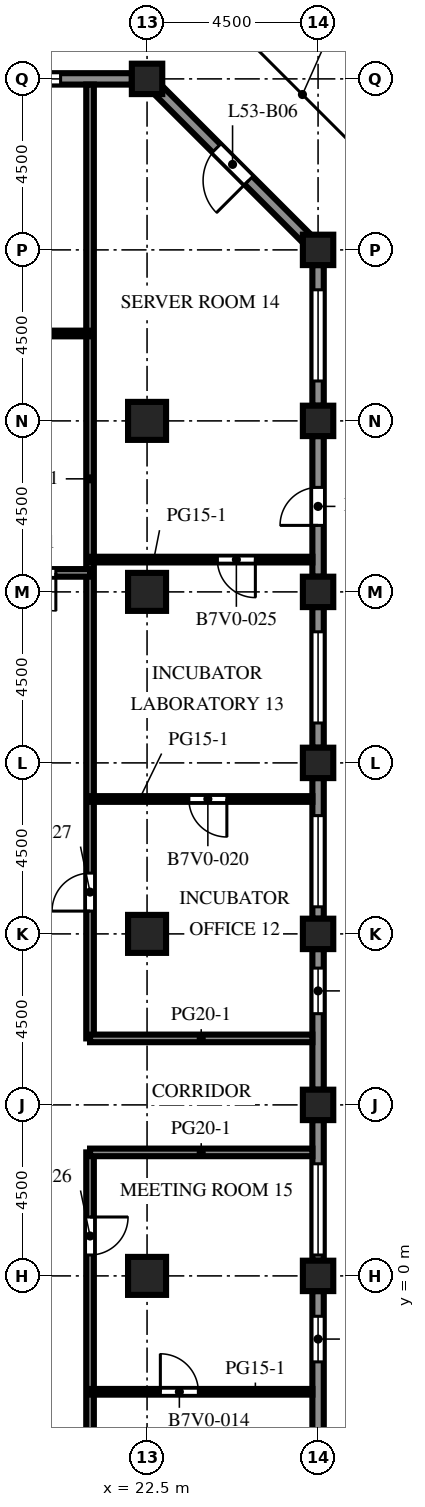
"""IFC4 building model, lengths in metres.
Left out: names, types, materials, properties, quantities, classifications, styles, units other than length and angle.
Written with IfcOpenShell. Run it as: python <this file> out.ifc"""

import sys

from ifc_helpers import new_model, si_unit, direction, frame, frame_2d, origin, origin_2d, place, context, subcontext, project, spatial, rectangle, extrude, element, fill, save


model = new_model("IFC4")
c1 = context("Model", 3, precision=1e-05, world=origin(), true_north=direction((0.0, 1.0)))
c2 = subcontext(c1, "Body", "Model", "MODEL_VIEW")
j1 = project(units=[si_unit("LENGTHUNIT", "METRE"), si_unit("PLANEANGLEUNIT", "RADIAN")], contexts=[c1])
p1 = place(None, origin())
s1 = spatial("IfcSite", under=j1, at=p1, CompositionType="ELEMENT")
p2 = place(p1, origin())
s2 = spatial("IfcBuilding", under=s1, at=p2, CompositionType="ELEMENT")
p3 = place(p2, frame((0.0, 0.0, 235.7)))
s3 = spatial("IfcBuildingStorey", under=s2, at=p3, CompositionType="ELEMENT", Elevation=235.7)
for number, where, z_axis, x_axis in (
    (1, (22.5, 31.5, 0.0), (0.0, 0.0, 1.0), (1.0, 0.0, 0.0)),
    (2, (27.0, 0.0, 0.0), (0.0, 0.0, 1.0), (1.0, 0.0, 0.0)),
    (3, (27.0, 4.5, 0.0), (0.0, 0.0, 1.0), (1.0, 0.0, 0.0)),
    (4, (27.0, 9.0, 0.0), (0.0, 0.0, 1.0), (1.0, 0.0, 0.0)),
    (5, (27.0, 13.5, 0.0), (0.0, 0.0, 1.0), (1.0, 0.0, 0.0)),
    (6, (27.0, 18.0, 0.0), (0.0, 0.0, 1.0), (1.0, 0.0, 0.0)),
    (7, (27.0, 22.5, 0.0), (0.0, 0.0, 1.0), (1.0, 0.0, 0.0)),
    (8, (27.0, 27.0, 0.0), (0.0, 0.0, 1.0), (1.0, 0.0, 0.0)),
):
    element("IfcColumn", number, at=place(p3, frame(where, z_axis=z_axis, x_axis=x_axis)), inside=s3, PredefinedType="COLUMN", context=c2, shape_type="SweptSolid", body=[
        extrude(rectangle(XDim=0.8, YDim=0.8, at=origin_2d()), origin(), (0.0, 0.0, 1.0), 4.1),
    ])
for number, where, z_axis, x_axis in (
    (9, (22.5, 0.0, 0.0), (0.0, 0.0, 1.0), (1.0, 0.0, 0.0)),
    (10, (22.5, 9.0, 0.0), (0.0, 0.0, 1.0), (1.0, 0.0, 0.0)),
    (11, (22.5, 18.0, 0.0), (0.0, 0.0, 1.0), (1.0, 0.0, 0.0)),
    (12, (22.5, 22.5, 0.0), (0.0, 0.0, 1.0), (1.0, 0.0, 0.0)),
):
    element("IfcColumn", number, at=place(p3, frame(where, z_axis=z_axis, x_axis=x_axis)), inside=s3, PredefinedType="COLUMN", context=c2, shape_type="SweptSolid", body=[
        extrude(rectangle(XDim=1.0, YDim=1.0, at=origin_2d()), origin(), (0.0, 0.0, 1.0), 4.1),
    ])
p4 = place(p3, frame((27.0, -0.4, 0.0), z_axis=(0.0, 0.0, 1.0), x_axis=(0.0, -1.0, 0.0)))
e13 = element("IfcWall", 13, at=p4, inside=s3, PredefinedType="SOLIDWALL", context=c2, shape_type="SweptSolid", body=[
    extrude(rectangle(XDim=3.7, YDim=0.3, at=frame_2d((1.85, 0.0))), origin(), (0.0, 0.0, 1.0), 2.85),
])
p5 = place(p4, frame((0.663, 0.0, 0.8)))
e14 = element("IfcOpeningElement", 14, at=p5, cuts=e13, PredefinedType="OPENING", context=c2, shape_type="SweptSolid", body=[
    extrude(rectangle(XDim=1.2, YDim=1.7, at=frame_2d((0.6, 0.85))), frame((0.0, 0.16, 0.0), z_axis=(0.0, -1.0, 0.0), x_axis=(1.0, 0.0, 0.0)), (0.0, 0.0, 1.0), 0.32),
])
p6 = place(p3, frame((27.0, 4.1, 0.0), z_axis=(0.0, 0.0, 1.0), x_axis=(0.0, -1.0, 0.0)))
e15 = element("IfcWall", 15, at=p6, inside=s3, PredefinedType="SOLIDWALL", context=c2, shape_type="SweptSolid", body=[
    extrude(rectangle(XDim=3.7, YDim=0.3, at=frame_2d((1.85, 0.0))), origin(), (0.0, 0.0, 1.0), 2.85),
])
p7 = place(p6, frame((1.15, 0.0, 0.8)))
e16 = element("IfcOpeningElement", 16, at=p7, cuts=e15, PredefinedType="OPENING", context=c2, shape_type="SweptSolid", body=[
    extrude(rectangle(XDim=2.4, YDim=1.7, at=frame_2d((1.2, 0.85))), frame((0.0, 0.16, 0.0), z_axis=(0.0, -1.0, 0.0), x_axis=(1.0, 0.0, 0.0)), (0.0, 0.0, 1.0), 0.32),
])
p8 = place(p3, frame((27.0, 8.6, 0.0), z_axis=(0.0, 0.0, 1.0), x_axis=(0.0, -1.0, 0.0)))
e17 = element("IfcWall", 17, at=p8, inside=s3, PredefinedType="SOLIDWALL", context=c2, shape_type="SweptSolid", body=[
    extrude(rectangle(XDim=3.7, YDim=0.3, at=frame_2d((1.85, 0.0))), origin(), (0.0, 0.0, 1.0), 2.85),
])
p9 = place(p8, frame((0.5, 0.0, 0.8)))
e18 = element("IfcOpeningElement", 18, at=p9, cuts=e17, PredefinedType="OPENING", context=c2, shape_type="SweptSolid", body=[
    extrude(rectangle(XDim=1.2, YDim=1.7, at=frame_2d((0.6, 0.85))), frame((0.0, 0.16, 0.0), z_axis=(0.0, -1.0, 0.0), x_axis=(1.0, 0.0, 0.0)), (0.0, 0.0, 1.0), 0.32),
])
p10 = place(p3, frame((27.0, 13.1, 0.0), z_axis=(0.0, 0.0, 1.0), x_axis=(0.0, -1.0, 0.0)))
e19 = element("IfcWall", 19, at=p10, inside=s3, PredefinedType="SOLIDWALL", context=c2, shape_type="SweptSolid", body=[
    extrude(rectangle(XDim=3.7, YDim=0.3, at=frame_2d((1.85, 0.0))), origin(), (0.0, 0.0, 1.0), 2.85),
])
p11 = place(p10, frame((0.988, 0.0, 0.8)))
e20 = element("IfcOpeningElement", 20, at=p11, cuts=e19, PredefinedType="OPENING", context=c2, shape_type="SweptSolid", body=[
    extrude(rectangle(XDim=2.4, YDim=1.7, at=frame_2d((1.2, 0.85))), frame((0.0, 0.16, 0.0), z_axis=(0.0, -1.0, 0.0), x_axis=(1.0, 0.0, 0.0)), (0.0, 0.0, 1.0), 0.32),
])
p12 = place(p3, frame((27.0, 17.6, 0.0), z_axis=(0.0, 0.0, 1.0), x_axis=(0.0, -1.0, 0.0)))
e21 = element("IfcWall", 21, at=p12, inside=s3, PredefinedType="SOLIDWALL", context=c2, shape_type="SweptSolid", body=[
    extrude(rectangle(XDim=3.7, YDim=0.3, at=frame_2d((1.85, 0.0))), origin(), (0.0, 0.0, 1.0), 2.85),
])
p13 = place(p12, frame((0.65, 0.0, 0.8)))
e22 = element("IfcOpeningElement", 22, at=p13, cuts=e21, PredefinedType="OPENING", context=c2, shape_type="SweptSolid", body=[
    extrude(rectangle(XDim=2.4, YDim=1.7, at=frame_2d((1.2, 0.85))), frame((0.0, 0.16, 0.0), z_axis=(0.0, -1.0, 0.0), x_axis=(1.0, 0.0, 0.0)), (0.0, 0.0, 1.0), 0.32),
])
p14 = place(p3, frame((27.0, 22.1, 0.0), z_axis=(0.0, 0.0, 1.0), x_axis=(0.0, -1.0, 0.0)))
e23 = element("IfcWall", 23, at=p14, inside=s3, PredefinedType="SOLIDWALL", context=c2, shape_type="SweptSolid", body=[
    extrude(rectangle(XDim=3.7, YDim=0.3, at=frame_2d((1.85, 0.0))), origin(), (0.0, 0.0, 1.0), 2.85),
])
p15 = place(p14, frame((1.35, 0.0, 0.0)))
e24 = element("IfcOpeningElement", 24, at=p15, cuts=e23, PredefinedType="OPENING", context=c2, shape_type="SweptSolid", body=[
    extrude(rectangle(XDim=1.0, YDim=2.2, at=frame_2d((0.5, 1.1))), frame((0.0, 0.16, 0.0), z_axis=(0.0, -1.0, 0.0), x_axis=(1.0, 0.0, 0.0)), (0.0, 0.0, 1.0), 0.32),
])
p16 = place(p3, frame((27.0, 26.6, 0.0), z_axis=(0.0, 0.0, 1.0), x_axis=(0.0, -1.0, 0.0)))
e25 = element("IfcWall", 25, at=p16, inside=s3, PredefinedType="SOLIDWALL", context=c2, shape_type="SweptSolid", body=[
    extrude(rectangle(XDim=3.7, YDim=0.3, at=frame_2d((1.85, 0.0))), origin(), (0.0, 0.0, 1.0), 2.85),
])
p17 = place(p16, frame((0.65, 0.0, 0.8)))
e26 = element("IfcOpeningElement", 26, at=p17, cuts=e25, PredefinedType="OPENING", context=c2, shape_type="SweptSolid", body=[
    extrude(rectangle(XDim=2.4, YDim=1.7, at=frame_2d((1.2, 0.85))), frame((0.0, 0.16, 0.0), z_axis=(0.0, -1.0, 0.0), x_axis=(1.0, 0.0, 0.0)), (0.0, 0.0, 1.0), 0.32),
])
p18 = place(p3, frame((22.794, 31.206, 0.0), z_axis=(0.0, 0.0, 1.0), x_axis=(0.707106781187, -0.707106781187, 0.0)))
e27 = element("IfcWall", 27, at=p18, inside=s3, PredefinedType="SOLIDWALL", context=c2, shape_type="SweptSolid", body=[
    extrude(rectangle(XDim=5.532, YDim=0.3, at=frame_2d((2.766, 0.0))), origin(), (0.0, 0.0, 1.0), 2.85),
])
p19 = place(p18, frame((2.166, 0.0, 0.0)))
e28 = element("IfcOpeningElement", 28, at=p19, cuts=e27, PredefinedType="OPENING", context=c2, shape_type="SweptSolid", body=[
    extrude(rectangle(XDim=1.2, YDim=2.2, at=frame_2d((0.6, 1.1))), frame((0.0, 0.16, 0.0), z_axis=(0.0, -1.0, 0.0), x_axis=(1.0, 0.0, 0.0)), (0.0, 0.0, 1.0), 0.32),
])
p20 = place(p3, frame((18.4, 31.5, 0.0), z_axis=(0.0, 0.0, 1.0), x_axis=(1.0, 0.0, 0.0)))
e29 = element("IfcWall", 29, at=p20, inside=s3, PredefinedType="SOLIDWALL", context=c2, shape_type="SweptSolid", body=[
    extrude(rectangle(XDim=3.7, YDim=0.3, at=frame_2d((1.85, 0.0))), origin(), (0.0, 0.0, 1.0), 2.85),
])
p21 = place(p20, frame((0.625, 0.0, 0.8)))
e30 = element("IfcOpeningElement", 30, at=p21, cuts=e29, PredefinedType="OPENING", context=c2, shape_type="SweptSolid", body=[
    extrude(rectangle(XDim=1.2, YDim=1.7, at=frame_2d((0.6, 0.85))), frame((0.0, 0.16, 0.0), z_axis=(0.0, -1.0, 0.0), x_axis=(1.0, 0.0, 0.0)), (0.0, 0.0, 1.0), 0.32),
])
p22 = place(p3, frame((21.0, 3.25, 0.0), z_axis=(0.0, 0.0, 1.0), x_axis=(0.0, -1.0, 0.0)))
e31 = element("IfcWall", 31, at=p22, inside=s3, PredefinedType="PARTITIONING", context=c2, shape_type="SweptSolid", body=[
    extrude(rectangle(XDim=25.6, YDim=0.2, at=frame_2d((12.8, 0.0))), origin(), (0.0, 0.0, 1.0), 3.65),
])
p23 = place(p22, frame((1.7, 0.0, 0.0)))
e32 = element("IfcOpeningElement", 32, at=p23, cuts=e31, PredefinedType="OPENING", context=c2, shape_type="SweptSolid", body=[
    extrude(rectangle(XDim=1.0, YDim=2.1, at=frame_2d((0.5, 1.05))), frame((0.0, 0.11, 0.0), z_axis=(0.0, -1.0, 0.0), x_axis=(1.0, 0.0, 0.0)), (0.0, 0.0, 1.0), 0.22),
])
p24 = place(p3, frame((21.0, 31.35, 0.0), z_axis=(0.0, 0.0, 1.0), x_axis=(0.0, -1.0, 0.0)))
e33 = element("IfcWall", 33, at=p24, inside=s3, PredefinedType="PARTITIONING", context=c2, shape_type="SweptSolid", body=[
    extrude(rectangle(XDim=25.1, YDim=0.2, at=frame_2d((12.55, 0.0))), origin(), (0.0, 0.0, 1.0), 3.65),
])
p25 = place(p24, frame((20.75, 0.0, 0.0)))
e34 = element("IfcOpeningElement", 34, at=p25, cuts=e33, PredefinedType="OPENING", context=c2, shape_type="SweptSolid", body=[
    extrude(rectangle(XDim=1.0, YDim=2.1, at=frame_2d((0.5, 1.05))), frame((0.0, 0.11, 0.0), z_axis=(0.0, -1.0, 0.0), x_axis=(1.0, 0.0, 0.0)), (0.0, 0.0, 1.0), 0.22),
])
p26 = place(p3, frame((26.85, -3.05, 0.0), z_axis=(0.0, 0.0, 1.0), x_axis=(-1.0, 0.0, 0.0)))
e35 = element("IfcWall", 35, at=p26, inside=s3, PredefinedType="PARTITIONING", context=c2, shape_type="SweptSolid", body=[
    extrude(rectangle(XDim=5.85, YDim=0.15, at=frame_2d((2.925, 0.0))), origin(), (0.0, 0.0, 1.0), 3.65),
])
p27 = place(p26, frame((3.0, 0.0, 0.0)))
e36 = element("IfcOpeningElement", 36, at=p27, cuts=e35, PredefinedType="OPENING", context=c2, shape_type="SweptSolid", body=[
    extrude(rectangle(XDim=1.0, YDim=2.1, at=frame_2d((0.5, 1.05))), frame((0.0, 0.085, 0.0), z_axis=(0.0, -1.0, 0.0), x_axis=(1.0, 0.0, 0.0)), (0.0, 0.0, 1.0), 0.17),
])
for number, where, z_axis, x_axis in (
    (37, (21.0, 3.25, 0.0), (0.0, 0.0, 1.0), (1.0, 0.0, 0.0)),
    (38, (21.0, 6.25, 0.0), (0.0, 0.0, 1.0), (1.0, 0.0, 0.0)),
):
    element("IfcWall", number, at=place(p3, frame(where, z_axis=z_axis, x_axis=x_axis)), inside=s3, PredefinedType="PARTITIONING", context=c2, shape_type="SweptSolid", body=[
        extrude(rectangle(XDim=5.85, YDim=0.2, at=frame_2d((2.925, 0.0))), origin(), (0.0, 0.0, 1.0), 3.65),
    ])
p28 = place(p3, frame((21.0, 12.55, 0.0), z_axis=(0.0, 0.0, 1.0), x_axis=(1.0, 0.0, 0.0)))
e39 = element("IfcWall", 39, at=p28, inside=s3, PredefinedType="PARTITIONING", context=c2, shape_type="SweptSolid", body=[
    extrude(rectangle(XDim=5.85, YDim=0.15, at=frame_2d((2.925, 0.0))), origin(), (0.0, 0.0, 1.0), 3.65),
])
p29 = place(p28, frame((2.6, 0.0, 0.0)))
e40 = element("IfcOpeningElement", 40, at=p29, cuts=e39, PredefinedType="OPENING", context=c2, shape_type="SweptSolid", body=[
    extrude(rectangle(XDim=1.0, YDim=2.1, at=frame_2d((0.5, 1.05))), frame((0.0, 0.085, 0.0), z_axis=(0.0, -1.0, 0.0), x_axis=(1.0, 0.0, 0.0)), (0.0, 0.0, 1.0), 0.17),
])
p30 = place(p3, frame((18.0, 18.5, 0.0), z_axis=(0.0, 0.0, 1.0), x_axis=(1.0, 0.0, 0.0)))
e41 = element("IfcWall", 41, at=p30, inside=s3, PredefinedType="PARTITIONING", context=c2, shape_type="SweptSolid", body=[
    extrude(rectangle(XDim=3.0, YDim=0.2, at=frame_2d((1.5, 0.0))), origin(), (0.0, 0.0, 1.0), 3.65),
])
p31 = place(p30, frame((1.1, 0.0, 0.0)))
e42 = element("IfcOpeningElement", 42, at=p31, cuts=e41, PredefinedType="OPENING", context=c2, shape_type="SweptSolid", body=[
    extrude(rectangle(XDim=1.0, YDim=2.1, at=frame_2d((0.5, 1.05))), frame((0.0, 0.11, 0.0), z_axis=(0.0, -1.0, 0.0), x_axis=(1.0, 0.0, 0.0)), (0.0, 0.0, 1.0), 0.22),
])
p32 = place(p3, frame((21.0, 18.85, 0.0), z_axis=(0.0, 0.0, 1.0), x_axis=(1.0, 0.0, 0.0)))
e43 = element("IfcWall", 43, at=p32, inside=s3, PredefinedType="PARTITIONING", context=c2, shape_type="SweptSolid", body=[
    extrude(rectangle(XDim=5.85, YDim=0.15, at=frame_2d((2.925, 0.0))), origin(), (0.0, 0.0, 1.0), 3.65),
])
p33 = place(p32, frame((3.35, 0.0, 0.0)))
e44 = element("IfcOpeningElement", 44, at=p33, cuts=e43, PredefinedType="OPENING", context=c2, shape_type="SweptSolid", body=[
    extrude(rectangle(XDim=1.0, YDim=2.1, at=frame_2d((0.5, 1.05))), frame((0.0, 0.085, 0.0), z_axis=(0.0, -1.0, 0.0), x_axis=(1.0, 0.0, 0.0)), (0.0, 0.0, 1.0), 0.17),
])
p34 = place(p3, frame((-13.5, 24.8, 0.0), z_axis=(0.0, 0.0, 1.0), x_axis=(1.0, 0.0, 0.0)))
e45 = element("IfcWall", 45, at=p34, inside=s3, PredefinedType="PARTITIONING", context=c2, shape_type="SweptSolid", body=[
    extrude(rectangle(XDim=34.5, YDim=0.15, at=frame_2d((17.25, 0.0))), origin(), (0.0, 0.0, 1.0), 3.65),
])
p35 = place(p34, frame((1.6, 0.0, 0.0)))
e46 = element("IfcOpeningElement", 46, at=p35, cuts=e45, PredefinedType="OPENING", context=c2, shape_type="SweptSolid", body=[
    extrude(rectangle(XDim=1.0, YDim=2.1, at=frame_2d((0.5, 1.05))), frame((0.0, 0.085, 0.0), z_axis=(0.0, -1.0, 0.0), x_axis=(1.0, 0.0, 0.0)), (0.0, 0.0, 1.0), 0.17),
])
p36 = place(p34, frame((10.35, 0.0, 0.0)))
e47 = element("IfcOpeningElement", 47, at=p36, cuts=e45, PredefinedType="OPENING", context=c2, shape_type="SweptSolid", body=[
    extrude(rectangle(XDim=1.0, YDim=2.1, at=frame_2d((0.5, 1.05))), frame((0.0, 0.085, 0.0), z_axis=(0.0, -1.0, 0.0), x_axis=(1.0, 0.0, 0.0)), (0.0, 0.0, 1.0), 0.17),
])
p37 = place(p34, frame((22.35, 0.0, 0.0)))
e48 = element("IfcOpeningElement", 48, at=p37, cuts=e45, PredefinedType="OPENING", context=c2, shape_type="SweptSolid", body=[
    extrude(rectangle(XDim=1.0, YDim=2.1, at=frame_2d((0.5, 1.05))), frame((0.0, 0.085, 0.0), z_axis=(0.0, -1.0, 0.0), x_axis=(1.0, 0.0, 0.0)), (0.0, 0.0, 1.0), 0.17),
])
p38 = place(p34, frame((31.1, 0.0, 0.0)))
e49 = element("IfcOpeningElement", 49, at=p38, cuts=e45, PredefinedType="OPENING", context=c2, shape_type="SweptSolid", body=[
    extrude(rectangle(XDim=1.0, YDim=2.1, at=frame_2d((0.5, 1.05))), frame((0.0, 0.085, 0.0), z_axis=(0.0, -1.0, 0.0), x_axis=(1.0, 0.0, 0.0)), (0.0, 0.0, 1.0), 0.17),
])
p39 = place(p5, origin())
e50 = element("IfcWindow", 50, at=p39, inside=s3, PartitioningType="SINGLE_PANEL", PredefinedType="WINDOW", context=c2, shape_type="SweptSolid", body=[
    extrude(rectangle(XDim=1.2, YDim=1.7, at=frame_2d((0.6, 0.85))), frame((0.0, 0.03, 0.0), z_axis=(0.0, -1.0, 0.0), x_axis=(1.0, 0.0, 0.0)), (0.0, 0.0, 1.0), 0.06),
])
fill(e14, e50)
p40 = place(p7, origin())
e51 = element("IfcWindow", 51, at=p40, inside=s3, PartitioningType="SINGLE_PANEL", PredefinedType="WINDOW", context=c2, shape_type="SweptSolid", body=[
    extrude(rectangle(XDim=2.4, YDim=1.7, at=frame_2d((1.2, 0.85))), frame((0.0, 0.03, 0.0), z_axis=(0.0, -1.0, 0.0), x_axis=(1.0, 0.0, 0.0)), (0.0, 0.0, 1.0), 0.06),
])
fill(e16, e51)
p41 = place(p9, origin())
e52 = element("IfcWindow", 52, at=p41, inside=s3, PartitioningType="SINGLE_PANEL", PredefinedType="WINDOW", context=c2, shape_type="SweptSolid", body=[
    extrude(rectangle(XDim=1.2, YDim=1.7, at=frame_2d((0.6, 0.85))), frame((0.0, 0.03, 0.0), z_axis=(0.0, -1.0, 0.0), x_axis=(1.0, 0.0, 0.0)), (0.0, 0.0, 1.0), 0.06),
])
fill(e18, e52)
p42 = place(p11, origin())
e53 = element("IfcWindow", 53, at=p42, inside=s3, PartitioningType="SINGLE_PANEL", PredefinedType="WINDOW", context=c2, shape_type="SweptSolid", body=[
    extrude(rectangle(XDim=2.4, YDim=1.7, at=frame_2d((1.2, 0.85))), frame((0.0, 0.03, 0.0), z_axis=(0.0, -1.0, 0.0), x_axis=(1.0, 0.0, 0.0)), (0.0, 0.0, 1.0), 0.06),
])
fill(e20, e53)
p43 = place(p13, origin())
e54 = element("IfcWindow", 54, at=p43, inside=s3, PartitioningType="SINGLE_PANEL", PredefinedType="WINDOW", context=c2, shape_type="SweptSolid", body=[
    extrude(rectangle(XDim=2.4, YDim=1.7, at=frame_2d((1.2, 0.85))), frame((0.0, 0.03, 0.0), z_axis=(0.0, -1.0, 0.0), x_axis=(1.0, 0.0, 0.0)), (0.0, 0.0, 1.0), 0.06),
])
fill(e22, e54)
p44 = place(p15, origin())
e55 = element("IfcDoor", 55, at=p44, inside=s3, OperationType="SINGLE_SWING_RIGHT", PredefinedType="DOOR", context=c2, shape_type="SweptSolid", body=[
    extrude(rectangle(XDim=1.0, YDim=2.2, at=frame_2d((0.5, 1.1))), frame((0.0, 0.025, 0.0), z_axis=(0.0, -1.0, 0.0), x_axis=(1.0, 0.0, 0.0)), (0.0, 0.0, 1.0), 0.05),
])
fill(e24, e55)
p45 = place(p17, origin())
e56 = element("IfcWindow", 56, at=p45, inside=s3, PartitioningType="SINGLE_PANEL", PredefinedType="WINDOW", context=c2, shape_type="SweptSolid", body=[
    extrude(rectangle(XDim=2.4, YDim=1.7, at=frame_2d((1.2, 0.85))), frame((0.0, 0.03, 0.0), z_axis=(0.0, -1.0, 0.0), x_axis=(1.0, 0.0, 0.0)), (0.0, 0.0, 1.0), 0.06),
])
fill(e26, e56)
p46 = place(p19, origin())
e57 = element("IfcDoor", 57, at=p46, inside=s3, OperationType="SINGLE_SWING_RIGHT", PredefinedType="DOOR", context=c2, shape_type="SweptSolid", body=[
    extrude(rectangle(XDim=1.2, YDim=2.2, at=frame_2d((0.6, 1.1))), frame((0.0, 0.025, 0.0), z_axis=(0.0, -1.0, 0.0), x_axis=(1.0, 0.0, 0.0)), (0.0, 0.0, 1.0), 0.05),
])
fill(e28, e57)
p47 = place(p21, origin())
e58 = element("IfcWindow", 58, at=p47, inside=s3, PartitioningType="SINGLE_PANEL", PredefinedType="WINDOW", context=c2, shape_type="SweptSolid", body=[
    extrude(rectangle(XDim=1.2, YDim=1.7, at=frame_2d((0.6, 0.85))), frame((0.0, 0.03, 0.0), z_axis=(0.0, -1.0, 0.0), x_axis=(1.0, 0.0, 0.0)), (0.0, 0.0, 1.0), 0.06),
])
fill(e30, e58)
p48 = place(p27, origin())
e59 = element("IfcDoor", 59, at=p48, inside=s3, OperationType="SINGLE_SWING_RIGHT", PredefinedType="DOOR", context=c2, shape_type="SweptSolid", body=[
    extrude(rectangle(XDim=1.0, YDim=2.1, at=frame_2d((0.5, 1.05))), frame((0.0, 0.025, 0.0), z_axis=(0.0, -1.0, 0.0), x_axis=(1.0, 0.0, 0.0)), (0.0, 0.0, 1.0), 0.05),
])
fill(e36, e59)
p49 = place(p29, origin())
e60 = element("IfcDoor", 60, at=p49, inside=s3, OperationType="SINGLE_SWING_RIGHT", PredefinedType="DOOR", context=c2, shape_type="SweptSolid", body=[
    extrude(rectangle(XDim=1.0, YDim=2.1, at=frame_2d((0.5, 1.05))), frame((0.0, 0.025, 0.0), z_axis=(0.0, -1.0, 0.0), x_axis=(1.0, 0.0, 0.0)), (0.0, 0.0, 1.0), 0.05),
])
fill(e40, e60)
p50 = place(p31, origin())
e61 = element("IfcDoor", 61, at=p50, inside=s3, OperationType="SINGLE_SWING_RIGHT", PredefinedType="DOOR", context=c2, shape_type="SweptSolid", body=[
    extrude(rectangle(XDim=1.0, YDim=2.1, at=frame_2d((0.5, 1.05))), frame((0.0, 0.025, 0.0), z_axis=(0.0, -1.0, 0.0), x_axis=(1.0, 0.0, 0.0)), (0.0, 0.0, 1.0), 0.05),
])
fill(e42, e61)
p51 = place(p33, origin())
e62 = element("IfcDoor", 62, at=p51, inside=s3, OperationType="SINGLE_SWING_RIGHT", PredefinedType="DOOR", context=c2, shape_type="SweptSolid", body=[
    extrude(rectangle(XDim=1.0, YDim=2.1, at=frame_2d((0.5, 1.05))), frame((0.0, 0.025, 0.0), z_axis=(0.0, -1.0, 0.0), x_axis=(1.0, 0.0, 0.0)), (0.0, 0.0, 1.0), 0.05),
])
fill(e44, e62)
p52 = place(p23, origin())
e63 = element("IfcDoor", 63, at=p52, inside=s3, OperationType="SINGLE_SWING_LEFT", PredefinedType="DOOR", context=c2, shape_type="SweptSolid", body=[
    extrude(rectangle(XDim=1.0, YDim=2.1, at=frame_2d((0.5, 1.05))), frame((0.0, 0.025, 0.0), z_axis=(0.0, -1.0, 0.0), x_axis=(1.0, 0.0, 0.0)), (0.0, 0.0, 1.0), 0.05),
])
fill(e32, e63)
p53 = place(p25, origin())
e64 = element("IfcDoor", 64, at=p53, inside=s3, OperationType="SINGLE_SWING_RIGHT", PredefinedType="DOOR", context=c2, shape_type="SweptSolid", body=[
    extrude(rectangle(XDim=1.0, YDim=2.1, at=frame_2d((0.5, 1.05))), frame((0.0, 0.025, 0.0), z_axis=(0.0, -1.0, 0.0), x_axis=(1.0, 0.0, 0.0)), (0.0, 0.0, 1.0), 0.05),
])
fill(e34, e64)
save(model, sys.argv[1])
